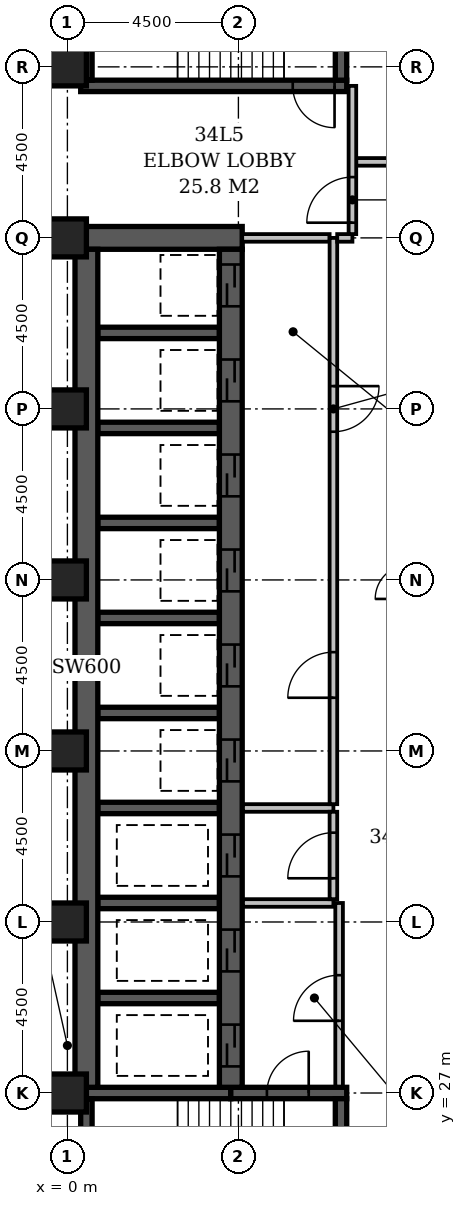
"""IFC4 building model, lengths in metres.
Left out: names, types, materials, properties, quantities, classifications, styles, units other than length and angle.
Written with IfcOpenShell. Run it as: python <this file> out.ifc"""

import sys

from ifc_helpers import new_model, si_unit, direction, frame, frame_2d, origin, origin_2d, place, context, subcontext, project, spatial, rectangle, extrude, element, fill, save


model = new_model("IFC4")
c1 = context("Model", 3, precision=1e-05, world=origin(), true_north=direction((0.0, 1.0)))
c2 = subcontext(c1, "Body", "Model", "MODEL_VIEW")
j1 = project(units=[si_unit("LENGTHUNIT", "METRE"), si_unit("PLANEANGLEUNIT", "RADIAN")], contexts=[c1])
p1 = place(None, origin())
s1 = spatial("IfcSite", under=j1, at=p1, CompositionType="ELEMENT")
p2 = place(p1, origin())
s2 = spatial("IfcBuilding", under=s1, at=p2, CompositionType="ELEMENT")
p3 = place(p2, frame((0.0, 0.0, 137.6)))
s3 = spatial("IfcBuildingStorey", under=s2, at=p3, CompositionType="ELEMENT", Elevation=137.6)
p4 = place(p3, frame((0.2, 49.5, -0.3), z_axis=(0.0, 0.0, 1.0), x_axis=(1.0, 0.0, 0.0)))
e1 = element("IfcWall", 1, at=p4, inside=s3, PredefinedType="SHEAR", context=c2, shape_type="SweptSolid", body=[
    extrude(rectangle(XDim=4.4, YDim=0.6, at=frame_2d((2.2, 0.0))), origin(), (0.0, 0.0, 1.0), 3.6),
])
p5 = place(p3, frame((0.35, 27.0, -0.3), z_axis=(0.0, 0.0, 1.0), x_axis=(1.0, 0.0, 0.0)))
e2 = element("IfcWall", 2, at=p5, inside=s3, PredefinedType="SHEAR", context=c2, shape_type="SweptSolid", body=[
    extrude(rectangle(XDim=3.95, YDim=0.3, at=frame_2d((1.975, 0.0))), origin(), (0.0, 0.0, 1.0), 3.6),
])
p6 = place(p3, frame((0.35, 53.5, -0.3), z_axis=(0.0, 0.0, 1.0), x_axis=(1.0, 0.0, 0.0)))
e3 = element("IfcWall", 3, at=p6, inside=s3, PredefinedType="SHEAR", context=c2, shape_type="SweptSolid", body=[
    extrude(rectangle(XDim=7.0, YDim=0.3, at=frame_2d((3.5, 0.0))), origin(), (0.0, 0.0, 1.0), 3.6),
])
p7 = place(p6, frame((5.58, 0.0, 0.3)))
e4 = element("IfcOpeningElement", 4, at=p7, cuts=e3, PredefinedType="OPENING", context=c2, shape_type="SweptSolid", body=[
    extrude(rectangle(XDim=1.1, YDim=2.1, at=frame_2d((0.55, 1.05))), frame((0.0, 0.162, 0.0), z_axis=(0.0, -1.0, 0.0), x_axis=(1.0, 0.0, 0.0)), (0.0, 0.0, 1.0), 0.324),
])
p8 = place(p3, frame((0.5, 22.65, -0.3), z_axis=(0.0, 0.0, 1.0), x_axis=(0.0, 1.0, 0.0)))
e5 = element("IfcWall", 5, at=p8, inside=s3, PredefinedType="SHEAR", context=c2, shape_type="SweptSolid", body=[
    extrude(rectangle(XDim=4.2, YDim=0.3, at=frame_2d((2.1, 0.0))), origin(), (0.0, 0.0, 1.0), 3.6),
])
p9 = place(p3, frame((0.5, 27.15, -0.3), z_axis=(0.0, 0.0, 1.0), x_axis=(0.0, 1.0, 0.0)))
e6 = element("IfcWall", 6, at=p9, inside=s3, PredefinedType="SHEAR", context=c2, shape_type="SweptSolid", body=[
    extrude(rectangle(XDim=22.05, YDim=0.6, at=frame_2d((11.025, 0.0))), origin(), (0.0, 0.0, 1.0), 3.6),
])
p10 = place(p3, frame((0.5, 53.65, -0.3), z_axis=(0.0, 0.0, 1.0), x_axis=(0.0, 1.0, 0.0)))
e7 = element("IfcWall", 7, at=p10, inside=s3, PredefinedType="SHEAR", context=c2, shape_type="SweptSolid", body=[
    extrude(rectangle(XDim=4.2, YDim=0.3, at=frame_2d((2.1, 0.0))), origin(), (0.0, 0.0, 1.0), 3.6),
])
for number, where, z_axis, x_axis in (
    (8, (0.8, 29.5, -0.3), (0.0, 0.0, 1.0), (1.0, 0.0, 0.0)),
    (9, (0.8, 32.0, -0.3), (0.0, 0.0, 1.0), (1.0, 0.0, 0.0)),
    (10, (0.8, 34.5, -0.3), (0.0, 0.0, 1.0), (1.0, 0.0, 0.0)),
    (11, (0.8, 37.0, -0.3), (0.0, 0.0, 1.0), (1.0, 0.0, 0.0)),
    (12, (0.8, 39.5, -0.3), (0.0, 0.0, 1.0), (1.0, 0.0, 0.0)),
    (13, (0.8, 42.0, -0.3), (0.0, 0.0, 1.0), (1.0, 0.0, 0.0)),
    (14, (0.8, 44.5, -0.3), (0.0, 0.0, 1.0), (1.0, 0.0, 0.0)),
    (15, (0.8, 47.0, -0.3), (0.0, 0.0, 1.0), (1.0, 0.0, 0.0)),
):
    element("IfcWall", number, at=place(p3, frame(where, z_axis=z_axis, x_axis=x_axis)), inside=s3, PredefinedType="SHEAR", context=c2, shape_type="SweptSolid", body=[
        extrude(rectangle(XDim=3.2, YDim=0.3, at=frame_2d((1.6, 0.0))), origin(), (0.0, 0.0, 1.0), 3.6),
    ])
p11 = place(p3, frame((4.3, 27.0, -0.3), z_axis=(0.0, 0.0, 1.0), x_axis=(1.0, 0.0, 0.0)))
e16 = element("IfcWall", 16, at=p11, inside=s3, PredefinedType="SHEAR", context=c2, shape_type="SweptSolid", body=[
    extrude(rectangle(XDim=3.05, YDim=0.3, at=frame_2d((1.525, 0.0))), origin(), (0.0, 0.0, 1.0), 3.6),
])
p12 = place(p11, frame((0.95, 0.0, 0.3)))
e17 = element("IfcOpeningElement", 17, at=p12, cuts=e16, PredefinedType="OPENING", context=c2, shape_type="SweptSolid", body=[
    extrude(rectangle(XDim=1.1, YDim=2.1, at=frame_2d((0.55, 1.05))), frame((0.0, 0.162, 0.0), z_axis=(0.0, -1.0, 0.0), x_axis=(1.0, 0.0, 0.0)), (0.0, 0.0, 1.0), 0.324),
])
p13 = place(p3, frame((4.3, 27.15, -0.3), z_axis=(0.0, 0.0, 1.0), x_axis=(0.0, 1.0, 0.0)))
e18 = element("IfcWall", 18, at=p13, inside=s3, PredefinedType="SHEAR", context=c2, shape_type="SweptSolid", body=[
    extrude(rectangle(XDim=22.05, YDim=0.6, at=frame_2d((11.025, 0.0))), origin(), (0.0, 0.0, 1.0), 3.6),
])
p14 = place(p13, frame((3.05, 0.0, 0.3)))
e19 = element("IfcOpeningElement", 19, at=p14, cuts=e18, PredefinedType="OPENING", context=c2, shape_type="SweptSolid", body=[
    extrude(rectangle(XDim=1.1, YDim=2.1, at=frame_2d((0.55, 1.05))), frame((0.0, 0.312, 0.0), z_axis=(0.0, -1.0, 0.0), x_axis=(1.0, 0.0, 0.0)), (0.0, 0.0, 1.0), 0.624),
])
p15 = place(p13, frame((0.55, 0.0, 0.3)))
e20 = element("IfcOpeningElement", 20, at=p15, cuts=e18, PredefinedType="OPENING", context=c2, shape_type="SweptSolid", body=[
    extrude(rectangle(XDim=1.1, YDim=2.1, at=frame_2d((0.55, 1.05))), frame((0.0, 0.312, 0.0), z_axis=(0.0, -1.0, 0.0), x_axis=(1.0, 0.0, 0.0)), (0.0, 0.0, 1.0), 0.624),
])
p16 = place(p13, frame((20.55, 0.0, 0.3)))
e21 = element("IfcOpeningElement", 21, at=p16, cuts=e18, PredefinedType="OPENING", context=c2, shape_type="SweptSolid", body=[
    extrude(rectangle(XDim=1.1, YDim=2.1, at=frame_2d((0.55, 1.05))), frame((0.0, 0.312, 0.0), z_axis=(0.0, -1.0, 0.0), x_axis=(1.0, 0.0, 0.0)), (0.0, 0.0, 1.0), 0.624),
])
p17 = place(p13, frame((18.05, 0.0, 0.3)))
e22 = element("IfcOpeningElement", 22, at=p17, cuts=e18, PredefinedType="OPENING", context=c2, shape_type="SweptSolid", body=[
    extrude(rectangle(XDim=1.1, YDim=2.1, at=frame_2d((0.55, 1.05))), frame((0.0, 0.312, 0.0), z_axis=(0.0, -1.0, 0.0), x_axis=(1.0, 0.0, 0.0)), (0.0, 0.0, 1.0), 0.624),
])
p18 = place(p13, frame((15.55, 0.0, 0.3)))
e23 = element("IfcOpeningElement", 23, at=p18, cuts=e18, PredefinedType="OPENING", context=c2, shape_type="SweptSolid", body=[
    extrude(rectangle(XDim=1.1, YDim=2.1, at=frame_2d((0.55, 1.05))), frame((0.0, 0.312, 0.0), z_axis=(0.0, -1.0, 0.0), x_axis=(1.0, 0.0, 0.0)), (0.0, 0.0, 1.0), 0.624),
])
p19 = place(p13, frame((13.05, 0.0, 0.3)))
e24 = element("IfcOpeningElement", 24, at=p19, cuts=e18, PredefinedType="OPENING", context=c2, shape_type="SweptSolid", body=[
    extrude(rectangle(XDim=1.1, YDim=2.1, at=frame_2d((0.55, 1.05))), frame((0.0, 0.312, 0.0), z_axis=(0.0, -1.0, 0.0), x_axis=(1.0, 0.0, 0.0)), (0.0, 0.0, 1.0), 0.624),
])
p20 = place(p13, frame((10.55, 0.0, 0.3)))
e25 = element("IfcOpeningElement", 25, at=p20, cuts=e18, PredefinedType="OPENING", context=c2, shape_type="SweptSolid", body=[
    extrude(rectangle(XDim=1.1, YDim=2.1, at=frame_2d((0.55, 1.05))), frame((0.0, 0.312, 0.0), z_axis=(0.0, -1.0, 0.0), x_axis=(1.0, 0.0, 0.0)), (0.0, 0.0, 1.0), 0.624),
])
p21 = place(p13, frame((8.05, 0.0, 0.3)))
e26 = element("IfcOpeningElement", 26, at=p21, cuts=e18, PredefinedType="OPENING", context=c2, shape_type="SweptSolid", body=[
    extrude(rectangle(XDim=1.1, YDim=2.1, at=frame_2d((0.55, 1.05))), frame((0.0, 0.312, 0.0), z_axis=(0.0, -1.0, 0.0), x_axis=(1.0, 0.0, 0.0)), (0.0, 0.0, 1.0), 0.624),
])
p22 = place(p13, frame((5.55, 0.0, 0.3)))
e27 = element("IfcOpeningElement", 27, at=p22, cuts=e18, PredefinedType="OPENING", context=c2, shape_type="SweptSolid", body=[
    extrude(rectangle(XDim=1.1, YDim=2.1, at=frame_2d((0.55, 1.05))), frame((0.0, 0.312, 0.0), z_axis=(0.0, -1.0, 0.0), x_axis=(1.0, 0.0, 0.0)), (0.0, 0.0, 1.0), 0.624),
])
p23 = place(p3, frame((7.2, 22.65, -0.3), z_axis=(0.0, 0.0, 1.0), x_axis=(0.0, 1.0, 0.0)))
e28 = element("IfcWall", 28, at=p23, inside=s3, PredefinedType="SHEAR", context=c2, shape_type="SweptSolid", body=[
    extrude(rectangle(XDim=4.2, YDim=0.3, at=frame_2d((2.1, 0.0))), origin(), (0.0, 0.0, 1.0), 3.6),
])
p24 = place(p23, frame((0.8, 0.0, 0.3)))
e29 = element("IfcOpeningElement", 29, at=p24, cuts=e28, PredefinedType="OPENING", context=c2, shape_type="SweptSolid", body=[
    extrude(rectangle(XDim=1.1, YDim=2.1, at=frame_2d((0.55, 1.05))), frame((0.0, 0.162, 0.0), z_axis=(0.0, -1.0, 0.0), x_axis=(1.0, 0.0, 0.0)), (0.0, 0.0, 1.0), 0.324),
])
p25 = place(p3, frame((7.2, 53.65, -0.3), z_axis=(0.0, 0.0, 1.0), x_axis=(0.0, 1.0, 0.0)))
e30 = element("IfcWall", 30, at=p25, inside=s3, PredefinedType="SHEAR", context=c2, shape_type="SweptSolid", body=[
    extrude(rectangle(XDim=4.2, YDim=0.3, at=frame_2d((2.1, 0.0))), origin(), (0.0, 0.0, 1.0), 3.6),
])
for number, where, z_axis, x_axis in (
    (31, (0.0, 27.0, -0.3), (0.0, 0.0, 1.0), (1.0, 0.0, 0.0)),
    (32, (0.0, 31.5, -0.3), (0.0, 0.0, 1.0), (1.0, 0.0, 0.0)),
    (33, (0.0, 36.0, -0.3), (0.0, 0.0, 1.0), (1.0, 0.0, 0.0)),
    (34, (0.0, 40.5, -0.3), (0.0, 0.0, 1.0), (1.0, 0.0, 0.0)),
    (35, (0.0, 45.0, -0.3), (0.0, 0.0, 1.0), (1.0, 0.0, 0.0)),
    (36, (0.0, 49.5, -0.3), (0.0, 0.0, 1.0), (1.0, 0.0, 0.0)),
    (37, (0.0, 54.0, -0.3), (0.0, 0.0, 1.0), (1.0, 0.0, 0.0)),
):
    element("IfcColumn", number, at=place(p3, frame(where, z_axis=z_axis, x_axis=x_axis)), inside=s3, PredefinedType="COLUMN", context=c2, shape_type="SweptSolid", body=[
        extrude(rectangle(XDim=1.0, YDim=1.0, at=origin_2d()), origin(), (0.0, 0.0, 1.0), 3.6),
    ])
p26 = place(p3, frame((4.62, 34.5, 0.0), z_axis=(0.0, 0.0, 1.0), x_axis=(1.0, 0.0, 0.0)))
e38 = element("IfcWall", 38, at=p26, inside=s3, PredefinedType="PARTITIONING", context=c2, shape_type="SweptSolid", body=[
    extrude(rectangle(XDim=2.38, YDim=0.2, at=frame_2d((1.19, 0.0))), origin(), (0.0, 0.0, 1.0), 3.3),
])
p27 = place(p3, frame((7.0, 34.6, 0.0), z_axis=(0.0, 0.0, 1.0), x_axis=(0.0, 1.0, 0.0)))
e39 = element("IfcWall", 39, at=p27, inside=s3, PredefinedType="PARTITIONING", context=c2, shape_type="SweptSolid", body=[
    extrude(rectangle(XDim=14.9, YDim=0.2, at=frame_2d((7.45, 0.0))), origin(), (0.0, 0.0, 1.0), 3.3),
])
p28 = place(p27, frame((2.8, 0.0, 0.0)))
e40 = element("IfcOpeningElement", 40, at=p28, cuts=e39, PredefinedType="OPENING", context=c2, shape_type="SweptSolid", body=[
    extrude(rectangle(XDim=1.2, YDim=2.1, at=frame_2d((0.6, 1.05))), frame((0.0, 0.112, 0.0), z_axis=(0.0, -1.0, 0.0), x_axis=(1.0, 0.0, 0.0)), (0.0, 0.0, 1.0), 0.224),
])
p29 = place(p27, frame((9.8, 0.0, 0.0)))
e41 = element("IfcOpeningElement", 41, at=p29, cuts=e39, PredefinedType="OPENING", context=c2, shape_type="SweptSolid", body=[
    extrude(rectangle(XDim=1.2, YDim=2.1, at=frame_2d((0.6, 1.05))), frame((0.0, 0.112, 0.0), z_axis=(0.0, -1.0, 0.0), x_axis=(1.0, 0.0, 0.0)), (0.0, 0.0, 1.0), 0.224),
])
p30 = place(p3, frame((4.6, 49.5, 0.0), z_axis=(0.0, 0.0, 1.0), x_axis=(1.0, 0.0, 0.0)))
e42 = element("IfcWall", 42, at=p30, inside=s3, PredefinedType="PARTITIONING", context=c2, shape_type="SweptSolid", body=[
    extrude(rectangle(XDim=2.3, YDim=0.2, at=frame_2d((1.15, 0.0))), origin(), (0.0, 0.0, 1.0), 3.3),
])
p31 = place(p3, frame((4.62, 32.0, 0.0), z_axis=(0.0, 0.0, 1.0), x_axis=(1.0, 0.0, 0.0)))
e43 = element("IfcWall", 43, at=p31, inside=s3, PredefinedType="PARTITIONING", context=c2, shape_type="SweptSolid", body=[
    extrude(rectangle(XDim=2.38, YDim=0.2, at=frame_2d((1.19, 0.0))), origin(), (0.0, 0.0, 1.0), 3.3),
])
p32 = place(p3, frame((7.0, 32.1, 0.0), z_axis=(0.0, 0.0, 1.0), x_axis=(0.0, 1.0, 0.0)))
e44 = element("IfcWall", 44, at=p32, inside=s3, PredefinedType="PARTITIONING", context=c2, shape_type="SweptSolid", body=[
    extrude(rectangle(XDim=2.3, YDim=0.2, at=frame_2d((1.15, 0.0))), origin(), (0.0, 0.0, 1.0), 3.3),
])
p33 = place(p32, frame((0.55, 0.0, 0.0)))
e45 = element("IfcOpeningElement", 45, at=p33, cuts=e44, PredefinedType="OPENING", context=c2, shape_type="SweptSolid", body=[
    extrude(rectangle(XDim=1.2, YDim=2.1, at=frame_2d((0.6, 1.05))), frame((0.0, 0.112, 0.0), z_axis=(0.0, -1.0, 0.0), x_axis=(1.0, 0.0, 0.0)), (0.0, 0.0, 1.0), 0.224),
])
p34 = place(p3, frame((7.15, 27.17, 0.0), z_axis=(0.0, 0.0, 1.0), x_axis=(0.0, 1.0, 0.0)))
e46 = element("IfcWall", 46, at=p34, inside=s3, PredefinedType="PARTITIONING", context=c2, shape_type="SweptSolid", body=[
    extrude(rectangle(XDim=4.83, YDim=0.2, at=frame_2d((2.415, 0.0))), origin(), (0.0, 0.0, 1.0), 3.3),
])
p35 = place(p34, frame((1.73, 0.0, 0.0)))
e47 = element("IfcOpeningElement", 47, at=p35, cuts=e46, PredefinedType="OPENING", context=c2, shape_type="SweptSolid", body=[
    extrude(rectangle(XDim=1.2, YDim=2.1, at=frame_2d((0.6, 1.05))), frame((0.0, 0.112, 0.0), z_axis=(0.0, -1.0, 0.0), x_axis=(1.0, 0.0, 0.0)), (0.0, 0.0, 1.0), 0.224),
])
p36 = place(p3, frame((7.1, 49.5, 0.0), z_axis=(0.0, 0.0, 1.0), x_axis=(1.0, 0.0, 0.0)))
e48 = element("IfcWall", 48, at=p36, inside=s3, PredefinedType="PARTITIONING", context=c2, shape_type="SweptSolid", body=[
    extrude(rectangle(XDim=0.4, YDim=0.2, at=frame_2d((0.2, 0.0))), origin(), (0.0, 0.0, 1.0), 3.3),
])
p37 = place(p3, frame((7.5, 49.6, 0.0), z_axis=(0.0, 0.0, 1.0), x_axis=(0.0, 1.0, 0.0)))
e49 = element("IfcWall", 49, at=p37, inside=s3, PredefinedType="PARTITIONING", context=c2, shape_type="SweptSolid", body=[
    extrude(rectangle(XDim=3.9, YDim=0.2, at=frame_2d((1.95, 0.0))), origin(), (0.0, 0.0, 1.0), 3.3),
])
p38 = place(p37, frame((0.3, 0.0, 0.0)))
e50 = element("IfcOpeningElement", 50, at=p38, cuts=e49, PredefinedType="OPENING", context=c2, shape_type="SweptSolid", body=[
    extrude(rectangle(XDim=1.2, YDim=2.1, at=frame_2d((0.6, 1.05))), frame((0.0, 0.112, 0.0), z_axis=(0.0, -1.0, 0.0), x_axis=(1.0, 0.0, 0.0)), (0.0, 0.0, 1.0), 0.224),
])
p39 = place(p3, frame((7.6, 51.5, 0.0), z_axis=(0.0, 0.0, 1.0), x_axis=(1.0, 0.0, 0.0)))
e51 = element("IfcWall", 51, at=p39, inside=s3, PredefinedType="PARTITIONING", context=c2, shape_type="SweptSolid", body=[
    extrude(rectangle(XDim=15.3, YDim=0.2, at=frame_2d((7.65, 0.0))), origin(), (0.0, 0.0, 1.0), 3.3),
])
p40 = place(p39, frame((7.2, 0.0, 0.0)))
e52 = element("IfcOpeningElement", 52, at=p40, cuts=e51, PredefinedType="OPENING", context=c2, shape_type="SweptSolid", body=[
    extrude(rectangle(XDim=0.9, YDim=2.1, at=frame_2d((0.45, 1.05))), frame((0.0, 0.112, 0.0), z_axis=(0.0, -1.0, 0.0), x_axis=(1.0, 0.0, 0.0)), (0.0, 0.0, 1.0), 0.224),
])
p41 = place(p38, origin())
e53 = element("IfcDoor", 53, at=p41, inside=s3, OperationType="SINGLE_SWING_LEFT", PredefinedType="DOOR", context=c2, shape_type="SweptSolid", body=[
    extrude(rectangle(XDim=1.2, YDim=2.1, at=frame_2d((0.6, 1.05))), frame((0.0, 0.025, 0.0), z_axis=(0.0, -1.0, 0.0), x_axis=(1.0, 0.0, 0.0)), (0.0, 0.0, 1.0), 0.05),
])
fill(e50, e53)
p42 = place(p35, origin())
e54 = element("IfcDoor", 54, at=p42, inside=s3, OperationType="SINGLE_SWING_LEFT", PredefinedType="DOOR", context=c2, shape_type="SweptSolid", body=[
    extrude(rectangle(XDim=1.2, YDim=2.1, at=frame_2d((0.6, 1.05))), frame((0.0, 0.025, 0.0), z_axis=(0.0, -1.0, 0.0), x_axis=(1.0, 0.0, 0.0)), (0.0, 0.0, 1.0), 0.05),
])
fill(e47, e54)
p43 = place(p14, origin())
e55 = element("IfcDoor", 55, at=p43, inside=s3, OperationType="SLIDING_TO_LEFT", PredefinedType="DOOR", context=c2, shape_type="SweptSolid", body=[
    extrude(rectangle(XDim=1.1, YDim=2.1, at=frame_2d((0.55, 1.05))), frame((0.0, 0.025, 0.0), z_axis=(0.0, -1.0, 0.0), x_axis=(1.0, 0.0, 0.0)), (0.0, 0.0, 1.0), 0.05),
])
fill(e19, e55)
p44 = place(p15, origin())
e56 = element("IfcDoor", 56, at=p44, inside=s3, OperationType="SLIDING_TO_LEFT", PredefinedType="DOOR", context=c2, shape_type="SweptSolid", body=[
    extrude(rectangle(XDim=1.1, YDim=2.1, at=frame_2d((0.55, 1.05))), frame((0.0, 0.025, 0.0), z_axis=(0.0, -1.0, 0.0), x_axis=(1.0, 0.0, 0.0)), (0.0, 0.0, 1.0), 0.05),
])
fill(e20, e56)
p45 = place(p16, origin())
e57 = element("IfcDoor", 57, at=p45, inside=s3, OperationType="SLIDING_TO_LEFT", PredefinedType="DOOR", context=c2, shape_type="SweptSolid", body=[
    extrude(rectangle(XDim=1.1, YDim=2.1, at=frame_2d((0.55, 1.05))), frame((0.0, 0.025, 0.0), z_axis=(0.0, -1.0, 0.0), x_axis=(1.0, 0.0, 0.0)), (0.0, 0.0, 1.0), 0.05),
])
fill(e21, e57)
p46 = place(p17, origin())
e58 = element("IfcDoor", 58, at=p46, inside=s3, OperationType="SLIDING_TO_LEFT", PredefinedType="DOOR", context=c2, shape_type="SweptSolid", body=[
    extrude(rectangle(XDim=1.1, YDim=2.1, at=frame_2d((0.55, 1.05))), frame((0.0, 0.025, 0.0), z_axis=(0.0, -1.0, 0.0), x_axis=(1.0, 0.0, 0.0)), (0.0, 0.0, 1.0), 0.05),
])
fill(e22, e58)
p47 = place(p18, origin())
e59 = element("IfcDoor", 59, at=p47, inside=s3, OperationType="SLIDING_TO_LEFT", PredefinedType="DOOR", context=c2, shape_type="SweptSolid", body=[
    extrude(rectangle(XDim=1.1, YDim=2.1, at=frame_2d((0.55, 1.05))), frame((0.0, 0.025, 0.0), z_axis=(0.0, -1.0, 0.0), x_axis=(1.0, 0.0, 0.0)), (0.0, 0.0, 1.0), 0.05),
])
fill(e23, e59)
p48 = place(p19, origin())
e60 = element("IfcDoor", 60, at=p48, inside=s3, OperationType="SLIDING_TO_LEFT", PredefinedType="DOOR", context=c2, shape_type="SweptSolid", body=[
    extrude(rectangle(XDim=1.1, YDim=2.1, at=frame_2d((0.55, 1.05))), frame((0.0, 0.025, 0.0), z_axis=(0.0, -1.0, 0.0), x_axis=(1.0, 0.0, 0.0)), (0.0, 0.0, 1.0), 0.05),
])
fill(e24, e60)
p49 = place(p20, origin())
e61 = element("IfcDoor", 61, at=p49, inside=s3, OperationType="SLIDING_TO_LEFT", PredefinedType="DOOR", context=c2, shape_type="SweptSolid", body=[
    extrude(rectangle(XDim=1.1, YDim=2.1, at=frame_2d((0.55, 1.05))), frame((0.0, 0.025, 0.0), z_axis=(0.0, -1.0, 0.0), x_axis=(1.0, 0.0, 0.0)), (0.0, 0.0, 1.0), 0.05),
])
fill(e25, e61)
p50 = place(p21, origin())
e62 = element("IfcDoor", 62, at=p50, inside=s3, OperationType="SLIDING_TO_LEFT", PredefinedType="DOOR", context=c2, shape_type="SweptSolid", body=[
    extrude(rectangle(XDim=1.1, YDim=2.1, at=frame_2d((0.55, 1.05))), frame((0.0, 0.025, 0.0), z_axis=(0.0, -1.0, 0.0), x_axis=(1.0, 0.0, 0.0)), (0.0, 0.0, 1.0), 0.05),
])
fill(e26, e62)
p51 = place(p28, origin())
e63 = element("IfcDoor", 63, at=p51, inside=s3, OperationType="SINGLE_SWING_LEFT", PredefinedType="DOOR", context=c2, shape_type="SweptSolid", body=[
    extrude(rectangle(XDim=1.2, YDim=2.1, at=frame_2d((0.6, 1.05))), frame((0.0, 0.025, 0.0), z_axis=(0.0, -1.0, 0.0), x_axis=(1.0, 0.0, 0.0)), (0.0, 0.0, 1.0), 0.05),
])
fill(e40, e63)
p52 = place(p29, origin())
e64 = element("IfcDoor", 64, at=p52, inside=s3, OperationType="SINGLE_SWING_RIGHT", PredefinedType="DOOR", context=c2, shape_type="SweptSolid", body=[
    extrude(rectangle(XDim=1.2, YDim=2.1, at=frame_2d((0.6, 1.05))), frame((0.0, 0.025, 0.0), z_axis=(0.0, -1.0, 0.0), x_axis=(1.0, 0.0, 0.0)), (0.0, 0.0, 1.0), 0.05),
])
fill(e41, e64)
p53 = place(p33, origin())
e65 = element("IfcDoor", 65, at=p53, inside=s3, OperationType="SINGLE_SWING_LEFT", PredefinedType="DOOR", context=c2, shape_type="SweptSolid", body=[
    extrude(rectangle(XDim=1.2, YDim=2.1, at=frame_2d((0.6, 1.05))), frame((0.0, 0.025, 0.0), z_axis=(0.0, -1.0, 0.0), x_axis=(1.0, 0.0, 0.0)), (0.0, 0.0, 1.0), 0.05),
])
fill(e45, e65)
p54 = place(p22, origin())
e66 = element("IfcDoor", 66, at=p54, inside=s3, OperationType="SLIDING_TO_LEFT", PredefinedType="DOOR", context=c2, shape_type="SweptSolid", body=[
    extrude(rectangle(XDim=1.1, YDim=2.1, at=frame_2d((0.55, 1.05))), frame((0.0, 0.025, 0.0), z_axis=(0.0, -1.0, 0.0), x_axis=(1.0, 0.0, 0.0)), (0.0, 0.0, 1.0), 0.05),
])
fill(e27, e66)
p55 = place(p12, frame((1.1, 0.0, 0.0), z_axis=(0.0, 0.0, 1.0), x_axis=(-1.0, 0.0, 0.0)))
e67 = element("IfcDoor", 67, at=p55, inside=s3, OperationType="SINGLE_SWING_LEFT", PredefinedType="DOOR", context=c2, shape_type="SweptSolid", body=[
    extrude(rectangle(XDim=1.1, YDim=2.1, at=frame_2d((0.55, 1.05))), frame((0.0, 0.025, 0.0), z_axis=(0.0, -1.0, 0.0), x_axis=(1.0, 0.0, 0.0)), (0.0, 0.0, 1.0), 0.05),
])
fill(e17, e67)
p56 = place(p7, origin())
e68 = element("IfcDoor", 68, at=p56, inside=s3, OperationType="SINGLE_SWING_RIGHT", PredefinedType="DOOR", context=c2, shape_type="SweptSolid", body=[
    extrude(rectangle(XDim=1.1, YDim=2.1, at=frame_2d((0.55, 1.05))), frame((0.0, 0.025, 0.0), z_axis=(0.0, -1.0, 0.0), x_axis=(1.0, 0.0, 0.0)), (0.0, 0.0, 1.0), 0.05),
])
fill(e4, e68)
save(model, sys.argv[1])
